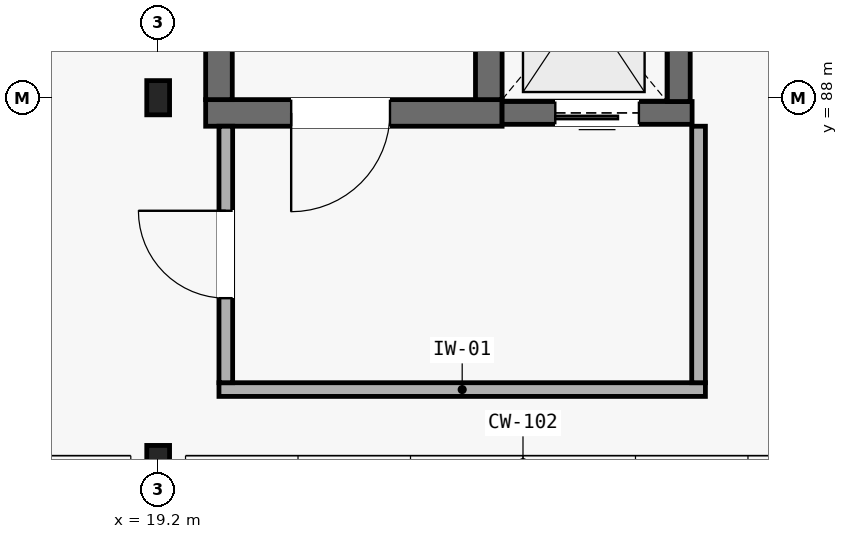
"""IFC4 building model, lengths in metres.
Left out: names, types, materials, properties, quantities, classifications, styles, units other than length and angle.
Written with IfcOpenShell. Run it as: python <this file> out.ifc"""

import sys

from ifc_helpers import new_model, si_unit, direction, frame, frame_2d, origin, origin_2d, place, context, subcontext, project, spatial, rectangle, i_section, extrude, element, fill, save


model = new_model("IFC4")
c1 = context("Model", 3, precision=1e-05, world=origin(), true_north=direction((0.0, 1.0)))
c2 = subcontext(c1, "Body", "Model", "MODEL_VIEW")
j1 = project(units=[si_unit("LENGTHUNIT", "METRE"), si_unit("PLANEANGLEUNIT", "RADIAN")], contexts=[c1])
p1 = place(None, origin())
s1 = spatial("IfcSite", under=j1, at=p1, CompositionType="ELEMENT")
p2 = place(p1, origin())
s2 = spatial("IfcBuilding", under=s1, at=p2, CompositionType="ELEMENT")
p3 = place(p2, frame((0.0, 0.0, 26.25)))
s3 = spatial("IfcBuildingStorey", under=s2, at=p3, CompositionType="ELEMENT", Elevation=26.25)
for number, where, z_axis, x_axis in (
    (1, (19.2, 83.2, 0.0), (0.0, 0.0, 1.0), (1.0, 0.0, 0.0)),
    (2, (19.2, 88.0, 0.0), (0.0, 0.0, 1.0), (1.0, 0.0, 0.0)),
):
    element("IfcColumn", number, at=place(p3, frame(where, z_axis=z_axis, x_axis=x_axis)), inside=s3, PredefinedType="COLUMN", context=c2, shape_type="SweptSolid", body=[
        extrude(i_section(OverallWidth=0.3, OverallDepth=0.45, WebThickness=0.014, FlangeThickness=0.026, FilletRadius=0.027, at=origin_2d()), origin(), (0.0, 0.0, 1.0), 4.9),
    ])
p4 = place(p3, frame((19.825, 87.8, 0.0), z_axis=(0.0, 0.0, 1.0), x_axis=(1.0, 0.0, 0.0)))
e3 = element("IfcWall", 3, at=p4, inside=s3, PredefinedType="SHEAR", context=c2, shape_type="SweptSolid", body=[
    extrude(rectangle(XDim=3.9, YDim=0.35, at=frame_2d((1.95, 0.0))), origin(), (0.0, 0.0, 1.0), 4.71),
])
p5 = place(p4, frame((1.125, 0.0, 0.0)))
e4 = element("IfcOpeningElement", 4, at=p5, cuts=e3, PredefinedType="OPENING", context=c2, shape_type="SweptSolid", body=[
    extrude(rectangle(XDim=1.3, YDim=2.15, at=frame_2d((0.65, 1.075))), frame((0.0, 0.185, 0.0), z_axis=(0.0, -1.0, 0.0), x_axis=(1.0, 0.0, 0.0)), (0.0, 0.0, 1.0), 0.37),
])
for number, where, z_axis, x_axis in (
    (5, (20.0, 87.975, 0.0), (0.0, 0.0, 1.0), (0.0, 1.0, 0.0)),
    (6, (23.55, 87.975, 0.0), (0.0, 0.0, 1.0), (0.0, 1.0, 0.0)),
):
    element("IfcWall", number, at=place(p3, frame(where, z_axis=z_axis, x_axis=x_axis)), inside=s3, PredefinedType="SHEAR", context=c2, shape_type="SweptSolid", body=[
        extrude(rectangle(XDim=7.6, YDim=0.35, at=frame_2d((3.8, 0.0))), origin(), (0.0, 0.0, 1.0), 4.71),
    ])
p6 = place(p3, frame((23.725, 87.8, 0.0), z_axis=(0.0, 0.0, 1.0), x_axis=(1.0, 0.0, 0.0)))
e7 = element("IfcWall", 7, at=p6, inside=s3, PredefinedType="SHEAR", context=c2, shape_type="SweptSolid", body=[
    extrude(rectangle(XDim=2.5, YDim=0.3, at=frame_2d((1.25, 0.0))), origin(), (0.0, 0.0, 1.0), 4.71),
])
p7 = place(p6, frame((0.7, 0.0, 0.0)))
e8 = element("IfcOpeningElement", 8, at=p7, cuts=e7, PredefinedType="OPENING", context=c2, shape_type="SweptSolid", body=[
    extrude(rectangle(XDim=1.1, YDim=2.1, at=frame_2d((0.55, 1.05))), frame((0.0, 0.16, 0.0), z_axis=(0.0, -1.0, 0.0), x_axis=(1.0, 0.0, 0.0)), (0.0, 0.0, 1.0), 0.32),
])
p8 = place(p3, frame((26.05, 87.95, 0.0), z_axis=(0.0, 0.0, 1.0), x_axis=(0.0, 1.0, 0.0)))
e9 = element("IfcWall", 9, at=p8, inside=s3, PredefinedType="SHEAR", context=c2, shape_type="SweptSolid", body=[
    extrude(rectangle(XDim=2.65, YDim=0.3, at=frame_2d((1.325, 0.0))), origin(), (0.0, 0.0, 1.0), 4.71),
])
p9 = place(p3, frame((20.0, 84.16, 0.0), z_axis=(0.0, 0.0, 1.0), x_axis=(1.0, 0.0, 0.0)))
e10 = element("IfcWall", 10, at=p9, inside=s3, PredefinedType="PARTITIONING", context=c2, shape_type="SweptSolid", body=[
    extrude(rectangle(XDim=6.4, YDim=0.18, at=frame_2d((3.2, 0.0))), origin(), (0.0, 0.0, 1.0), 4.71),
])
p10 = place(p3, frame((20.09, 84.25, 0.0), z_axis=(0.0, 0.0, 1.0), x_axis=(0.0, 1.0, 0.0)))
e11 = element("IfcWall", 11, at=p10, inside=s3, PredefinedType="PARTITIONING", context=c2, shape_type="SweptSolid", body=[
    extrude(rectangle(XDim=3.375, YDim=0.18, at=frame_2d((1.688, 0.0))), origin(), (0.0, 0.0, 1.0), 4.71),
])
p11 = place(p10, frame((1.113, 0.0, 0.0)))
e12 = element("IfcOpeningElement", 12, at=p11, cuts=e11, PredefinedType="OPENING", context=c2, shape_type="SweptSolid", body=[
    extrude(rectangle(XDim=1.15, YDim=2.15, at=frame_2d((0.575, 1.075))), frame((0.0, 0.1, 0.0), z_axis=(0.0, -1.0, 0.0), x_axis=(1.0, 0.0, 0.0)), (0.0, 0.0, 1.0), 0.2),
])
p12 = place(p3, frame((26.31, 84.25, 0.0), z_axis=(0.0, 0.0, 1.0), x_axis=(0.0, 1.0, 0.0)))
e13 = element("IfcWall", 13, at=p12, inside=s3, PredefinedType="PARTITIONING", context=c2, shape_type="SweptSolid", body=[
    extrude(rectangle(XDim=3.375, YDim=0.18, at=frame_2d((1.688, 0.0))), origin(), (0.0, 0.0, 1.0), 4.71),
])
p13 = place(p5, frame((1.3, 0.0, 0.0), z_axis=(0.0, 0.0, 1.0), x_axis=(-1.0, 0.0, 0.0)))
e14 = element("IfcDoor", 14, at=p13, inside=s3, OperationType="SINGLE_SWING_LEFT", PredefinedType="DOOR", context=c2, shape_type="SweptSolid", body=[
    extrude(rectangle(XDim=1.3, YDim=2.15, at=frame_2d((0.65, 1.075))), frame((0.0, 0.025, 0.0), z_axis=(0.0, -1.0, 0.0), x_axis=(1.0, 0.0, 0.0)), (0.0, 0.0, 1.0), 0.05),
])
fill(e4, e14)
p14 = place(p7, frame((1.1, 0.0, 0.0), z_axis=(0.0, 0.0, 1.0), x_axis=(-1.0, 0.0, 0.0)))
e15 = element("IfcDoor", 15, at=p14, inside=s3, OperationType="SLIDING_TO_LEFT", PredefinedType="DOOR", context=c2, shape_type="SweptSolid", body=[
    extrude(rectangle(XDim=1.1, YDim=2.1, at=frame_2d((0.55, 1.05))), frame((0.0, 0.025, 0.0), z_axis=(0.0, -1.0, 0.0), x_axis=(1.0, 0.0, 0.0)), (0.0, 0.0, 1.0), 0.05),
])
fill(e8, e15)
p15 = place(p11, origin())
e16 = element("IfcDoor", 16, at=p15, inside=s3, OperationType="SINGLE_SWING_RIGHT", PredefinedType="DOOR", context=c2, shape_type="SweptSolid", body=[
    extrude(rectangle(XDim=1.15, YDim=2.15, at=frame_2d((0.575, 1.075))), frame((0.0, 0.025, 0.0), z_axis=(0.0, -1.0, 0.0), x_axis=(1.0, 0.0, 0.0)), (0.0, 0.0, 1.0), 0.05),
])
fill(e12, e16)
save(model, sys.argv[1])
